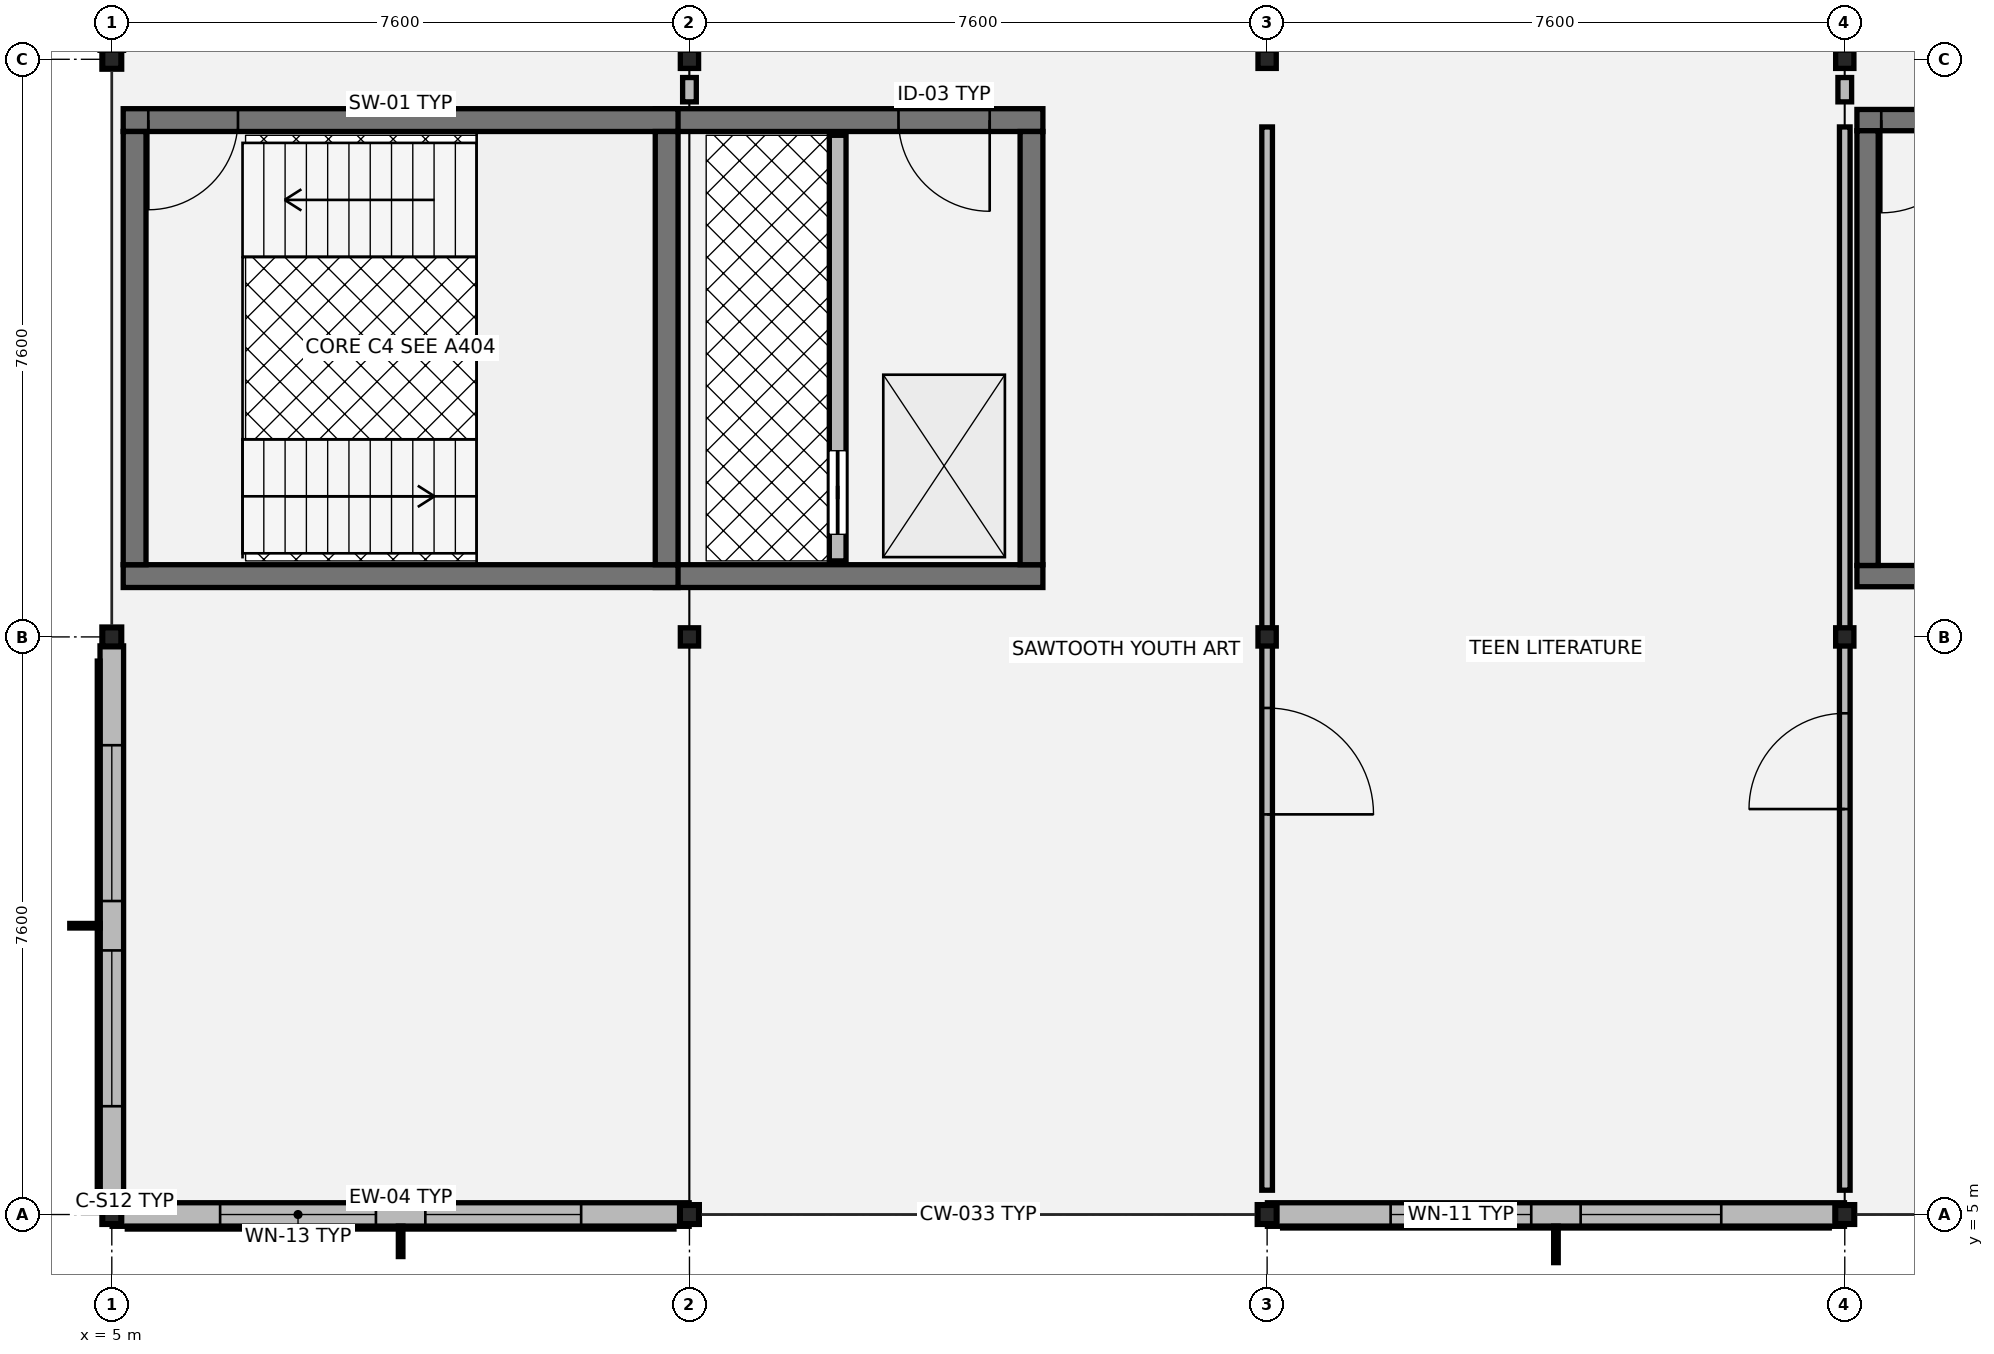
"""IFC4 building model, lengths in metres.
Left out: names, types, materials, properties, quantities, classifications, styles, units other than length and angle.
Written with IfcOpenShell. Run it as: python <this file> out.ifc"""

import sys

from ifc_helpers import new_model, si_unit, direction, frame, frame_2d, origin, origin_2d, place, context, subcontext, project, spatial, rectangle, i_section, extrude, element, fill, save


model = new_model("IFC4")
c1 = context("Model", 3, precision=1e-05, world=origin(), true_north=direction((0.0, 1.0)))
c2 = subcontext(c1, "Body", "Model", "MODEL_VIEW")
j1 = project(units=[si_unit("LENGTHUNIT", "METRE"), si_unit("PLANEANGLEUNIT", "RADIAN")], contexts=[c1])
p1 = place(None, origin())
s1 = spatial("IfcSite", under=j1, at=p1, CompositionType="ELEMENT")
p2 = place(p1, origin())
s2 = spatial("IfcBuilding", under=s1, at=p2, CompositionType="ELEMENT")
p3 = place(p2, frame((0.0, 0.0, 9.18)))
s3 = spatial("IfcBuildingStorey", under=s2, at=p3, CompositionType="ELEMENT", Elevation=9.18)
for number, where, z_axis, x_axis in (
    (1, (5.0, 5.0, 0.0), (0.0, 0.0, 1.0), (1.0, 0.0, 0.0)),
    (2, (5.0, 12.6, 0.0), (0.0, 0.0, 1.0), (1.0, 0.0, 0.0)),
):
    element("IfcColumn", number, at=place(p3, frame(where, z_axis=z_axis, x_axis=x_axis)), inside=s3, PredefinedType="COLUMN", context=c2, shape_type="SweptSolid", body=[
        extrude(i_section(OverallWidth=0.24, OverallDepth=0.24, WebThickness=0.01, FlangeThickness=0.017, at=origin_2d()), origin(), (0.0, 0.0, 1.0), 3.915),
    ])
p4 = place(p3, frame((5.0, 20.2, 0.0), z_axis=(0.0, 0.0, 1.0), x_axis=(1.0, 0.0, 0.0)))
e3 = element("IfcColumn", 3, at=p4, inside=s3, PredefinedType="COLUMN", context=c2, shape_type="SweptSolid", body=[
    extrude(i_section(OverallWidth=0.24, OverallDepth=0.24, WebThickness=0.01, FlangeThickness=0.017, at=origin_2d()), origin(), (0.0, 0.0, 1.0), 4.04),
])
for number, where, z_axis, x_axis in (
    (4, (12.6, 5.0, 0.0), (0.0, 0.0, 1.0), (1.0, 0.0, 0.0)),
    (5, (12.6, 12.6, 0.0), (0.0, 0.0, 1.0), (1.0, 0.0, 0.0)),
):
    element("IfcColumn", number, at=place(p3, frame(where, z_axis=z_axis, x_axis=x_axis)), inside=s3, PredefinedType="COLUMN", context=c2, shape_type="SweptSolid", body=[
        extrude(i_section(OverallWidth=0.24, OverallDepth=0.24, WebThickness=0.01, FlangeThickness=0.017, at=origin_2d()), origin(), (0.0, 0.0, 1.0), 3.915),
    ])
p5 = place(p3, frame((12.6, 20.2, 0.0), z_axis=(0.0, 0.0, 1.0), x_axis=(1.0, 0.0, 0.0)))
e6 = element("IfcColumn", 6, at=p5, inside=s3, PredefinedType="COLUMN", context=c2, shape_type="SweptSolid", body=[
    extrude(i_section(OverallWidth=0.24, OverallDepth=0.24, WebThickness=0.01, FlangeThickness=0.017, at=origin_2d()), origin(), (0.0, 0.0, 1.0), 4.04),
])
for number, where, z_axis, x_axis in (
    (7, (20.2, 5.0, 0.0), (0.0, 0.0, 1.0), (1.0, 0.0, 0.0)),
    (8, (20.2, 12.6, 0.0), (0.0, 0.0, 1.0), (1.0, 0.0, 0.0)),
):
    element("IfcColumn", number, at=place(p3, frame(where, z_axis=z_axis, x_axis=x_axis)), inside=s3, PredefinedType="COLUMN", context=c2, shape_type="SweptSolid", body=[
        extrude(i_section(OverallWidth=0.24, OverallDepth=0.24, WebThickness=0.01, FlangeThickness=0.017, at=origin_2d()), origin(), (0.0, 0.0, 1.0), 3.915),
    ])
p6 = place(p3, frame((20.2, 20.2, 0.0), z_axis=(0.0, 0.0, 1.0), x_axis=(1.0, 0.0, 0.0)))
e9 = element("IfcColumn", 9, at=p6, inside=s3, PredefinedType="COLUMN", context=c2, shape_type="SweptSolid", body=[
    extrude(i_section(OverallWidth=0.24, OverallDepth=0.24, WebThickness=0.01, FlangeThickness=0.017, at=origin_2d()), origin(), (0.0, 0.0, 1.0), 4.04),
])
for number, where, z_axis, x_axis in (
    (10, (27.8, 5.0, 0.0), (0.0, 0.0, 1.0), (1.0, 0.0, 0.0)),
    (11, (27.8, 12.6, 0.0), (0.0, 0.0, 1.0), (1.0, 0.0, 0.0)),
):
    element("IfcColumn", number, at=place(p3, frame(where, z_axis=z_axis, x_axis=x_axis)), inside=s3, PredefinedType="COLUMN", context=c2, shape_type="SweptSolid", body=[
        extrude(i_section(OverallWidth=0.24, OverallDepth=0.24, WebThickness=0.01, FlangeThickness=0.017, at=origin_2d()), origin(), (0.0, 0.0, 1.0), 3.915),
    ])
p7 = place(p3, frame((27.8, 20.2, 0.0), z_axis=(0.0, 0.0, 1.0), x_axis=(1.0, 0.0, 0.0)))
e12 = element("IfcColumn", 12, at=p7, inside=s3, PredefinedType="COLUMN", context=c2, shape_type="SweptSolid", body=[
    extrude(i_section(OverallWidth=0.24, OverallDepth=0.24, WebThickness=0.01, FlangeThickness=0.017, at=origin_2d()), origin(), (0.0, 0.0, 1.0), 4.04),
])
p8 = place(p3, frame((5.004, 5.0, 0.0), z_axis=(0.0, 0.0, 1.0), x_axis=(1.0, 0.0, 0.0)))
e13 = element("IfcWall", 13, at=p8, inside=s3, PredefinedType="SOLIDWALL", context=c2, shape_type="SweptSolid", body=[
    extrude(rectangle(XDim=7.592, YDim=0.31, at=frame_2d((3.796, 0.0))), origin(), (0.0, 0.0, 1.0), 3.48),
])
p9 = place(p8, frame((1.421, 0.0, 0.8)))
e14 = element("IfcOpeningElement", 14, at=p9, cuts=e13, PredefinedType="OPENING", context=c2, shape_type="SweptSolid", body=[
    extrude(rectangle(XDim=2.05, YDim=2.18, at=frame_2d((1.025, 1.09))), frame((0.0, 0.165, 0.0), z_axis=(0.0, -1.0, 0.0), x_axis=(1.0, 0.0, 0.0)), (0.0, 0.0, 1.0), 0.33),
])
p10 = place(p8, frame((4.121, 0.0, 0.8)))
e15 = element("IfcOpeningElement", 15, at=p10, cuts=e13, PredefinedType="OPENING", context=c2, shape_type="SweptSolid", body=[
    extrude(rectangle(XDim=2.05, YDim=2.18, at=frame_2d((1.025, 1.09))), frame((0.0, 0.165, 0.0), z_axis=(0.0, -1.0, 0.0), x_axis=(1.0, 0.0, 0.0)), (0.0, 0.0, 1.0), 0.33),
])
p11 = place(p3, frame((20.204, 5.0, 0.0), z_axis=(0.0, 0.0, 1.0), x_axis=(1.0, 0.0, 0.0)))
e16 = element("IfcWall", 16, at=p11, inside=s3, PredefinedType="SOLIDWALL", context=c2, shape_type="SweptSolid", body=[
    extrude(rectangle(XDim=7.592, YDim=0.31, at=frame_2d((3.796, 0.0))), origin(), (0.0, 0.0, 1.0), 3.48),
])
p12 = place(p11, frame((1.621, 0.0, 0.8)))
e17 = element("IfcOpeningElement", 17, at=p12, cuts=e16, PredefinedType="OPENING", context=c2, shape_type="SweptSolid", body=[
    extrude(rectangle(XDim=1.85, YDim=2.1, at=frame_2d((0.925, 1.05))), frame((0.0, 0.165, 0.0), z_axis=(0.0, -1.0, 0.0), x_axis=(1.0, 0.0, 0.0)), (0.0, 0.0, 1.0), 0.33),
])
p13 = place(p11, frame((4.121, 0.0, 0.8)))
e18 = element("IfcOpeningElement", 18, at=p13, cuts=e16, PredefinedType="OPENING", context=c2, shape_type="SweptSolid", body=[
    extrude(rectangle(XDim=1.85, YDim=2.1, at=frame_2d((0.925, 1.05))), frame((0.0, 0.165, 0.0), z_axis=(0.0, -1.0, 0.0), x_axis=(1.0, 0.0, 0.0)), (0.0, 0.0, 1.0), 0.33),
])
p14 = place(p3, frame((5.0, 12.482, 0.0), z_axis=(0.0, 0.0, 1.0), x_axis=(0.0, -1.0, 0.0)))
e19 = element("IfcWall", 19, at=p14, inside=s3, PredefinedType="SOLIDWALL", context=c2, shape_type="SweptSolid", body=[
    extrude(rectangle(XDim=7.364, YDim=0.31, at=frame_2d((3.682, 0.0))), origin(), (0.0, 0.0, 1.0), 3.48),
])
p15 = place(p14, frame((1.307, 0.0, 0.8)))
e20 = element("IfcOpeningElement", 20, at=p15, cuts=e19, PredefinedType="OPENING", context=c2, shape_type="SweptSolid", body=[
    extrude(rectangle(XDim=2.05, YDim=2.18, at=frame_2d((1.025, 1.09))), frame((0.0, 0.165, 0.0), z_axis=(0.0, -1.0, 0.0), x_axis=(1.0, 0.0, 0.0)), (0.0, 0.0, 1.0), 0.33),
])
p16 = place(p14, frame((4.007, 0.0, 0.8)))
e21 = element("IfcOpeningElement", 21, at=p16, cuts=e19, PredefinedType="OPENING", context=c2, shape_type="SweptSolid", body=[
    extrude(rectangle(XDim=2.05, YDim=2.18, at=frame_2d((1.025, 1.09))), frame((0.0, 0.165, 0.0), z_axis=(0.0, -1.0, 0.0), x_axis=(1.0, 0.0, 0.0)), (0.0, 0.0, 1.0), 0.33),
])
p17 = place(p3, frame((12.15, 13.4, 0.0), z_axis=(0.0, 0.0, 1.0), x_axis=(1.0, 0.0, 0.0)))
e22 = element("IfcWall", 22, at=p17, inside=s3, PredefinedType="SHEAR", context=c2, shape_type="SweptSolid", body=[
    extrude(rectangle(XDim=5.1, YDim=0.3, at=frame_2d((2.55, 0.0))), origin(), (0.0, 0.0, 1.0), 3.902),
])
p18 = place(p3, frame((17.25, 19.4, 0.0), z_axis=(0.0, 0.0, 1.0), x_axis=(-1.0, 0.0, 0.0)))
e23 = element("IfcWall", 23, at=p18, inside=s3, PredefinedType="SHEAR", context=c2, shape_type="SweptSolid", body=[
    extrude(rectangle(XDim=5.1, YDim=0.3, at=frame_2d((2.55, 0.0))), origin(), (0.0, 0.0, 1.0), 3.902),
])
p19 = place(p18, frame((0.7, 0.0, 0.0)))
e24 = element("IfcOpeningElement", 24, at=p19, cuts=e23, PredefinedType="OPENING", context=c2, shape_type="SweptSolid", body=[
    extrude(rectangle(XDim=1.2, YDim=2.16, at=frame_2d((0.6, 1.08))), frame((0.0, 0.16, 0.0), z_axis=(0.0, -1.0, 0.0), x_axis=(1.0, 0.0, 0.0)), (0.0, 0.0, 1.0), 0.32),
])
p20 = place(p3, frame((17.1, 13.55, 0.0), z_axis=(0.0, 0.0, 1.0), x_axis=(0.0, 1.0, 0.0)))
e25 = element("IfcWall", 25, at=p20, inside=s3, PredefinedType="SHEAR", context=c2, shape_type="SweptSolid", body=[
    extrude(rectangle(XDim=5.7, YDim=0.3, at=frame_2d((2.85, 0.0))), origin(), (0.0, 0.0, 1.0), 3.902),
])
p21 = place(p3, frame((14.55, 13.6, 0.0), z_axis=(0.0, 0.0, 1.0), x_axis=(0.0, 1.0, 0.0)))
e26 = element("IfcWall", 26, at=p21, inside=s3, PredefinedType="SOLIDWALL", context=c2, shape_type="SweptSolid", body=[
    extrude(rectangle(XDim=5.6, YDim=0.22, at=frame_2d((2.8, 0.0))), origin(), (0.0, 0.0, 1.0), 3.902),
])
p22 = place(p21, frame((0.35, 0.0, 0.0)))
e27 = element("IfcOpeningElement", 27, at=p22, cuts=e26, PredefinedType="OPENING", context=c2, shape_type="SweptSolid", body=[
    extrude(rectangle(XDim=1.1, YDim=2.15, at=frame_2d((0.55, 1.075))), frame((0.0, 0.12, 0.0), z_axis=(0.0, -1.0, 0.0), x_axis=(1.0, 0.0, 0.0)), (0.0, 0.0, 1.0), 0.24),
])
p23 = place(p3, frame((5.15, 13.4, 0.0), z_axis=(0.0, 0.0, 1.0), x_axis=(1.0, 0.0, 0.0)))
e28 = element("IfcWall", 28, at=p23, inside=s3, PredefinedType="SHEAR", context=c2, shape_type="SweptSolid", body=[
    extrude(rectangle(XDim=7.3, YDim=0.3, at=frame_2d((3.65, 0.0))), origin(), (0.0, 0.0, 1.0), 3.902),
])
p24 = place(p3, frame((5.15, 19.4, 0.0), z_axis=(0.0, 0.0, 1.0), x_axis=(1.0, 0.0, 0.0)))
e29 = element("IfcWall", 29, at=p24, inside=s3, PredefinedType="SHEAR", context=c2, shape_type="SweptSolid", body=[
    extrude(rectangle(XDim=7.3, YDim=0.3, at=frame_2d((3.65, 0.0))), origin(), (0.0, 0.0, 1.0), 3.902),
])
p25 = place(p24, frame((0.33, 0.0, 0.0)))
e30 = element("IfcOpeningElement", 30, at=p25, cuts=e29, PredefinedType="OPENING", context=c2, shape_type="SweptSolid", body=[
    extrude(rectangle(XDim=1.18, YDim=2.18, at=frame_2d((0.59, 1.09))), frame((0.0, 0.16, 0.0), z_axis=(0.0, -1.0, 0.0), x_axis=(1.0, 0.0, 0.0)), (0.0, 0.0, 1.0), 0.32),
])
for number, where, z_axis, x_axis in (
    (31, (5.3, 13.55, 0.0), (0.0, 0.0, 1.0), (0.0, 1.0, 0.0)),
    (32, (12.3, 13.55, 0.0), (0.0, 0.0, 1.0), (0.0, 1.0, 0.0)),
):
    element("IfcWall", number, at=place(p3, frame(where, z_axis=z_axis, x_axis=x_axis)), inside=s3, PredefinedType="SHEAR", context=c2, shape_type="SweptSolid", body=[
        extrude(rectangle(XDim=5.7, YDim=0.3, at=frame_2d((2.85, 0.0))), origin(), (0.0, 0.0, 1.0), 3.902),
    ])
p26 = place(p3, frame((27.96, 13.4, 0.0), z_axis=(0.0, 0.0, 1.0), x_axis=(1.0, 0.0, 0.0)))
e33 = element("IfcWall", 33, at=p26, inside=s3, PredefinedType="SHEAR", context=c2, shape_type="SweptSolid", body=[
    extrude(rectangle(XDim=7.28, YDim=0.28, at=frame_2d((3.64, 0.0))), origin(), (0.0, 0.0, 1.0), 3.902),
])
p27 = place(p3, frame((27.96, 19.4, 0.0), z_axis=(0.0, 0.0, 1.0), x_axis=(1.0, 0.0, 0.0)))
e34 = element("IfcWall", 34, at=p27, inside=s3, PredefinedType="SHEAR", context=c2, shape_type="SweptSolid", body=[
    extrude(rectangle(XDim=7.28, YDim=0.28, at=frame_2d((3.64, 0.0))), origin(), (0.0, 0.0, 1.0), 3.902),
])
p28 = place(p27, frame((0.32, 0.0, 0.0)))
e35 = element("IfcOpeningElement", 35, at=p28, cuts=e34, PredefinedType="OPENING", context=c2, shape_type="SweptSolid", body=[
    extrude(rectangle(XDim=1.22, YDim=2.18, at=frame_2d((0.61, 1.09))), frame((0.0, 0.15, 0.0), z_axis=(0.0, -1.0, 0.0), x_axis=(1.0, 0.0, 0.0)), (0.0, 0.0, 1.0), 0.3),
])
p29 = place(p3, frame((28.1, 13.54, 0.0), z_axis=(0.0, 0.0, 1.0), x_axis=(0.0, 1.0, 0.0)))
e36 = element("IfcWall", 36, at=p29, inside=s3, PredefinedType="SHEAR", context=c2, shape_type="SweptSolid", body=[
    extrude(rectangle(XDim=5.72, YDim=0.28, at=frame_2d((2.86, 0.0))), origin(), (0.0, 0.0, 1.0), 3.902),
])
for number, where, z_axis, x_axis in (
    (37, (12.6, 19.64, 0.0), (0.0, 0.0, 1.0), (0.0, 1.0, 0.0)),
    (38, (27.8, 19.64, 0.0), (0.0, 0.0, 1.0), (0.0, 1.0, 0.0)),
):
    element("IfcWall", number, at=place(p3, frame(where, z_axis=z_axis, x_axis=x_axis)), inside=s3, PredefinedType="PARTITIONING", context=c2, shape_type="SweptSolid", body=[
        extrude(rectangle(XDim=0.32, YDim=0.18, at=frame_2d((0.16, 0.0))), origin(), (0.0, 0.0, 1.0), 3.18),
    ])
p30 = place(p3, frame((20.2, 5.32, 0.0), z_axis=(0.0, 0.0, 1.0), x_axis=(0.0, 1.0, 0.0)))
e39 = element("IfcWall", 39, at=p30, inside=s3, PredefinedType="PARTITIONING", context=c2, shape_type="SweptSolid", body=[
    extrude(rectangle(XDim=13.99, YDim=0.14, at=frame_2d((6.995, 0.0))), origin(), (0.0, 0.0, 1.0), 3.18),
])
p31 = place(p30, frame((4.945, 0.0, 0.0)))
e40 = element("IfcOpeningElement", 40, at=p31, cuts=e39, PredefinedType="OPENING", context=c2, shape_type="SweptSolid", body=[
    extrude(rectangle(XDim=1.4, YDim=2.22, at=frame_2d((0.7, 1.11))), frame((0.0, 0.08, 0.0), z_axis=(0.0, -1.0, 0.0), x_axis=(1.0, 0.0, 0.0)), (0.0, 0.0, 1.0), 0.16),
])
p32 = place(p3, frame((27.8, 5.32, 0.0), z_axis=(0.0, 0.0, 1.0), x_axis=(0.0, 1.0, 0.0)))
e41 = element("IfcWall", 41, at=p32, inside=s3, PredefinedType="PARTITIONING", context=c2, shape_type="SweptSolid", body=[
    extrude(rectangle(XDim=13.99, YDim=0.14, at=frame_2d((6.995, 0.0))), origin(), (0.0, 0.0, 1.0), 2.445),
])
p33 = place(p32, frame((5.015, 0.0, 0.0)))
e42 = element("IfcOpeningElement", 42, at=p33, cuts=e41, PredefinedType="OPENING", context=c2, shape_type="SweptSolid", body=[
    extrude(rectangle(XDim=1.26, YDim=2.2, at=frame_2d((0.63, 1.1))), frame((0.0, 0.08, 0.0), z_axis=(0.0, -1.0, 0.0), x_axis=(1.0, 0.0, 0.0)), (0.0, 0.0, 1.0), 0.16),
])
p34 = place(p9, origin())
e43 = element("IfcWindow", 43, at=p34, inside=s3, PartitioningType="SINGLE_PANEL", PredefinedType="WINDOW", context=c2, shape_type="SweptSolid", body=[
    extrude(rectangle(XDim=2.05, YDim=2.18, at=frame_2d((1.025, 1.09))), frame((0.0, 0.03, 0.0), z_axis=(0.0, -1.0, 0.0), x_axis=(1.0, 0.0, 0.0)), (0.0, 0.0, 1.0), 0.06),
])
fill(e14, e43)
p35 = place(p10, origin())
e44 = element("IfcWindow", 44, at=p35, inside=s3, PartitioningType="SINGLE_PANEL", PredefinedType="WINDOW", context=c2, shape_type="SweptSolid", body=[
    extrude(rectangle(XDim=2.05, YDim=2.18, at=frame_2d((1.025, 1.09))), frame((0.0, 0.03, 0.0), z_axis=(0.0, -1.0, 0.0), x_axis=(1.0, 0.0, 0.0)), (0.0, 0.0, 1.0), 0.06),
])
fill(e15, e44)
p36 = place(p12, origin())
e45 = element("IfcWindow", 45, at=p36, inside=s3, PartitioningType="SINGLE_PANEL", PredefinedType="WINDOW", context=c2, shape_type="SweptSolid", body=[
    extrude(rectangle(XDim=1.85, YDim=2.1, at=frame_2d((0.925, 1.05))), frame((0.0, 0.03, 0.0), z_axis=(0.0, -1.0, 0.0), x_axis=(1.0, 0.0, 0.0)), (0.0, 0.0, 1.0), 0.06),
])
fill(e17, e45)
p37 = place(p13, origin())
e46 = element("IfcWindow", 46, at=p37, inside=s3, PartitioningType="SINGLE_PANEL", PredefinedType="WINDOW", context=c2, shape_type="SweptSolid", body=[
    extrude(rectangle(XDim=1.85, YDim=2.1, at=frame_2d((0.925, 1.05))), frame((0.0, 0.03, 0.0), z_axis=(0.0, -1.0, 0.0), x_axis=(1.0, 0.0, 0.0)), (0.0, 0.0, 1.0), 0.06),
])
fill(e18, e46)
p38 = place(p15, origin())
e47 = element("IfcWindow", 47, at=p38, inside=s3, PartitioningType="SINGLE_PANEL", PredefinedType="WINDOW", context=c2, shape_type="SweptSolid", body=[
    extrude(rectangle(XDim=2.05, YDim=2.18, at=frame_2d((1.025, 1.09))), frame((0.0, 0.03, 0.0), z_axis=(0.0, -1.0, 0.0), x_axis=(1.0, 0.0, 0.0)), (0.0, 0.0, 1.0), 0.06),
])
fill(e20, e47)
p39 = place(p16, origin())
e48 = element("IfcWindow", 48, at=p39, inside=s3, PartitioningType="SINGLE_PANEL", PredefinedType="WINDOW", context=c2, shape_type="SweptSolid", body=[
    extrude(rectangle(XDim=2.05, YDim=2.18, at=frame_2d((1.025, 1.09))), frame((0.0, 0.03, 0.0), z_axis=(0.0, -1.0, 0.0), x_axis=(1.0, 0.0, 0.0)), (0.0, 0.0, 1.0), 0.06),
])
fill(e21, e48)
p40 = place(p19, origin())
e49 = element("IfcDoor", 49, at=p40, inside=s3, OperationType="SINGLE_SWING_LEFT", PredefinedType="DOOR", context=c2, shape_type="SweptSolid", body=[
    extrude(rectangle(XDim=1.2, YDim=2.16, at=frame_2d((0.6, 1.08))), frame((0.0, 0.025, 0.0), z_axis=(0.0, -1.0, 0.0), x_axis=(1.0, 0.0, 0.0)), (0.0, 0.0, 1.0), 0.05),
])
fill(e24, e49)
p41 = place(p22, origin())
e50 = element("IfcDoor", 50, at=p41, inside=s3, OperationType="SLIDING_TO_LEFT", PredefinedType="DOOR", context=c2, shape_type="SweptSolid", body=[
    extrude(rectangle(XDim=1.1, YDim=2.15, at=frame_2d((0.55, 1.075))), frame((0.0, 0.025, 0.0), z_axis=(0.0, -1.0, 0.0), x_axis=(1.0, 0.0, 0.0)), (0.0, 0.0, 1.0), 0.05),
])
fill(e27, e50)
p42 = place(p25, origin())
e51 = element("IfcDoor", 51, at=p42, inside=s3, OperationType="SINGLE_SWING_RIGHT", PredefinedType="DOOR", context=c2, shape_type="SweptSolid", body=[
    extrude(rectangle(XDim=1.18, YDim=2.18, at=frame_2d((0.59, 1.09))), frame((0.0, 0.025, 0.0), z_axis=(0.0, -1.0, 0.0), x_axis=(1.0, 0.0, 0.0)), (0.0, 0.0, 1.0), 0.05),
])
fill(e30, e51)
p43 = place(p28, origin())
e52 = element("IfcDoor", 52, at=p43, inside=s3, OperationType="SINGLE_SWING_RIGHT", PredefinedType="DOOR", context=c2, shape_type="SweptSolid", body=[
    extrude(rectangle(XDim=1.22, YDim=2.18, at=frame_2d((0.61, 1.09))), frame((0.0, 0.025, 0.0), z_axis=(0.0, -1.0, 0.0), x_axis=(1.0, 0.0, 0.0)), (0.0, 0.0, 1.0), 0.05),
])
fill(e35, e52)
p44 = place(p31, origin())
e53 = element("IfcDoor", 53, at=p44, inside=s3, OperationType="SINGLE_SWING_RIGHT", PredefinedType="DOOR", context=c2, shape_type="SweptSolid", body=[
    extrude(rectangle(XDim=1.4, YDim=2.22, at=frame_2d((0.7, 1.11))), frame((0.0, 0.025, 0.0), z_axis=(0.0, -1.0, 0.0), x_axis=(1.0, 0.0, 0.0)), (0.0, 0.0, 1.0), 0.05),
])
fill(e40, e53)
p45 = place(p33, origin())
e54 = element("IfcDoor", 54, at=p45, inside=s3, OperationType="SINGLE_SWING_LEFT", PredefinedType="DOOR", context=c2, shape_type="SweptSolid", body=[
    extrude(rectangle(XDim=1.26, YDim=2.2, at=frame_2d((0.63, 1.1))), frame((0.0, 0.025, 0.0), z_axis=(0.0, -1.0, 0.0), x_axis=(1.0, 0.0, 0.0)), (0.0, 0.0, 1.0), 0.05),
])
fill(e42, e54)
save(model, sys.argv[1])
